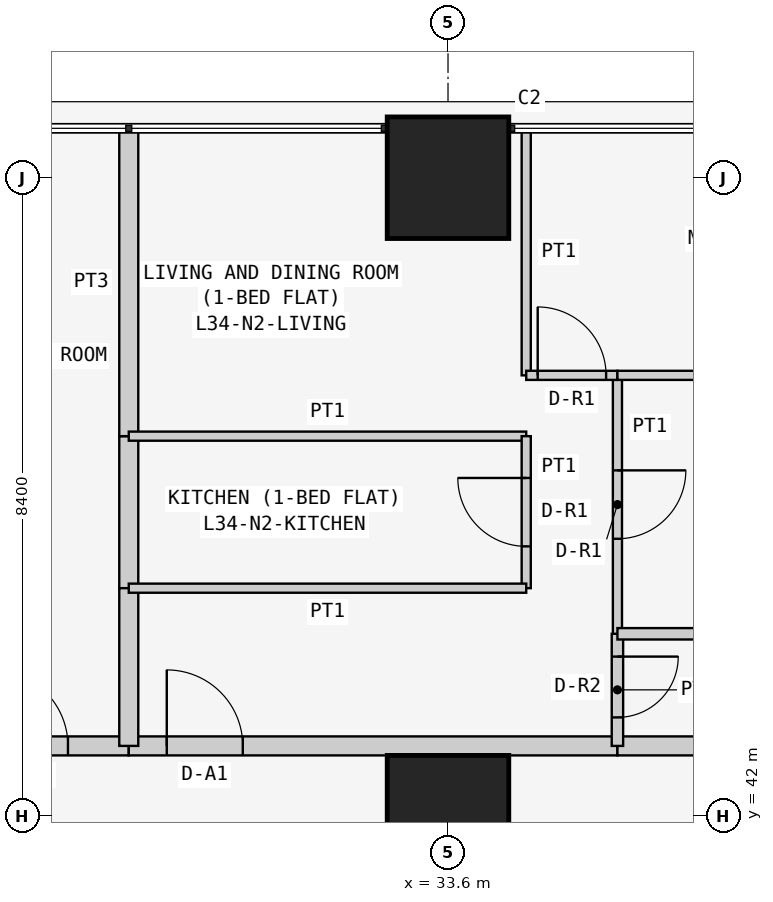
"""IFC4 building model, lengths in metres.
Left out: names, types, materials, properties, quantities, classifications, styles, units other than length and angle.
Written with IfcOpenShell. Run it as: python <this file> out.ifc"""

import sys

from ifc_helpers import new_model, si_unit, direction, frame, frame_2d, origin, origin_2d, place, context, subcontext, project, spatial, rectangle, extrude, element, fill, save


model = new_model("IFC4")
c1 = context("Model", 3, precision=1e-05, world=origin(), true_north=direction((0.0, 1.0)))
c2 = subcontext(c1, "Body", "Model", "MODEL_VIEW")
j1 = project(units=[si_unit("LENGTHUNIT", "METRE"), si_unit("PLANEANGLEUNIT", "RADIAN")], contexts=[c1])
p1 = place(None, origin())
s1 = spatial("IfcSite", under=j1, at=p1, CompositionType="ELEMENT")
p2 = place(p1, origin())
s2 = spatial("IfcBuilding", under=s1, at=p2, CompositionType="ELEMENT")
p3 = place(p2, frame((0.0, 0.0, 134.1)))
s3 = spatial("IfcBuildingStorey", under=s2, at=p3, CompositionType="ELEMENT", Elevation=134.1)
for number, where, z_axis, x_axis in (
    (1, (33.6, 42.0, 0.0), (0.0, 0.0, 1.0), (1.0, 0.0, 0.0)),
    (2, (33.6, 50.4, 0.0), (0.0, 0.0, 1.0), (1.0, 0.0, 0.0)),
):
    element("IfcColumn", number, at=place(p3, frame(where, z_axis=z_axis, x_axis=x_axis)), inside=s3, PredefinedType="COLUMN", context=c2, shape_type="SweptSolid", body=[
        extrude(rectangle(XDim=1.6, YDim=1.6, at=origin_2d()), origin(), (0.0, 0.0, 1.0), 3.6),
    ])
p4 = place(p3, frame((26.8, 42.925, 0.0), z_axis=(0.0, 0.0, 1.0), x_axis=(1.0, 0.0, 0.0)))
e3 = element("IfcWall", 3, at=p4, inside=s3, PredefinedType="PARTITIONING", context=c2, shape_type="SweptSolid", body=[
    extrude(rectangle(XDim=2.6, YDim=0.25, at=frame_2d((1.3, 0.0))), origin(), (0.0, 0.0, 1.0), 3.45),
])
p5 = place(p4, frame((0.8, 0.0, 0.0)))
e4 = element("IfcOpeningElement", 4, at=p5, cuts=e3, PredefinedType="OPENING", context=c2, shape_type="SweptSolid", body=[
    extrude(rectangle(XDim=1.0, YDim=2.1, at=frame_2d((0.5, 1.05))), frame((0.0, 0.135, 0.0), z_axis=(0.0, -1.0, 0.0), x_axis=(1.0, 0.0, 0.0)), (0.0, 0.0, 1.0), 0.27),
])
p6 = place(p3, frame((29.4, 42.925, 0.0), z_axis=(0.0, 0.0, 1.0), x_axis=(1.0, 0.0, 0.0)))
e5 = element("IfcWall", 5, at=p6, inside=s3, PredefinedType="PARTITIONING", context=c2, shape_type="SweptSolid", body=[
    extrude(rectangle(XDim=6.429, YDim=0.25, at=frame_2d((3.215, 0.0))), origin(), (0.0, 0.0, 1.0), 3.45),
])
p7 = place(p6, frame((0.5, 0.0, 0.0)))
e6 = element("IfcOpeningElement", 6, at=p7, cuts=e5, PredefinedType="OPENING", context=c2, shape_type="SweptSolid", body=[
    extrude(rectangle(XDim=1.0, YDim=2.1, at=frame_2d((0.5, 1.05))), frame((0.0, 0.135, 0.0), z_axis=(0.0, -1.0, 0.0), x_axis=(1.0, 0.0, 0.0)), (0.0, 0.0, 1.0), 0.27),
])
p8 = place(p3, frame((35.829, 42.925, 0.0), z_axis=(0.0, 0.0, 1.0), x_axis=(1.0, 0.0, 0.0)))
e7 = element("IfcWall", 7, at=p8, inside=s3, PredefinedType="PARTITIONING", context=c2, shape_type="SweptSolid", body=[
    extrude(rectangle(XDim=6.871, YDim=0.25, at=frame_2d((3.436, 0.0))), origin(), (0.0, 0.0, 1.0), 3.45),
])
p9 = place(p3, frame((29.4, 47.0, 0.0), z_axis=(0.0, 0.0, 1.0), x_axis=(0.0, -1.0, 0.0)))
e8 = element("IfcWall", 8, at=p9, inside=s3, PredefinedType="PARTITIONING", context=c2, shape_type="SweptSolid", body=[
    extrude(rectangle(XDim=2.0, YDim=0.25, at=frame_2d((1.0, 0.0))), origin(), (0.0, 0.0, 1.0), 2.848),
])
p10 = place(p3, frame((29.4, 45.0, 0.0), z_axis=(0.0, 0.0, 1.0), x_axis=(0.0, -1.0, 0.0)))
e9 = element("IfcWall", 9, at=p10, inside=s3, PredefinedType="PARTITIONING", context=c2, shape_type="SweptSolid", body=[
    extrude(rectangle(XDim=2.075, YDim=0.25, at=frame_2d((1.038, 0.0))), origin(), (0.0, 0.0, 1.0), 2.848),
])
p11 = place(p3, frame((29.4, 51.05, 0.0), z_axis=(0.0, 0.0, 1.0), x_axis=(0.0, -1.0, 0.0)))
e10 = element("IfcWall", 10, at=p11, inside=s3, PredefinedType="PARTITIONING", context=c2, shape_type="SweptSolid", body=[
    extrude(rectangle(XDim=4.05, YDim=0.25, at=frame_2d((2.025, 0.0))), origin(), (0.0, 0.0, 1.0), 2.848),
])
p12 = place(p3, frame((29.4, 47.0, 0.0), z_axis=(0.0, 0.0, 1.0), x_axis=(1.0, 0.0, 0.0)))
e11 = element("IfcWall", 11, at=p12, inside=s3, PredefinedType="PARTITIONING", context=c2, shape_type="SweptSolid", body=[
    extrude(rectangle(XDim=5.229, YDim=0.12, at=frame_2d((2.615, 0.0))), origin(), (0.0, 0.0, 1.0), 3.45),
])
p13 = place(p3, frame((34.629, 47.0, 0.0), z_axis=(0.0, 0.0, 1.0), x_axis=(0.0, -1.0, 0.0)))
e12 = element("IfcWall", 12, at=p13, inside=s3, PredefinedType="PARTITIONING", context=c2, shape_type="SweptSolid", body=[
    extrude(rectangle(XDim=2.0, YDim=0.12, at=frame_2d((1.0, 0.0))), origin(), (0.0, 0.0, 1.0), 3.45),
])
p14 = place(p13, frame((0.55, 0.0, 0.0)))
e13 = element("IfcOpeningElement", 13, at=p14, cuts=e12, PredefinedType="OPENING", context=c2, shape_type="SweptSolid", body=[
    extrude(rectangle(XDim=0.9, YDim=2.1, at=frame_2d((0.45, 1.05))), frame((0.0, 0.07, 0.0), z_axis=(0.0, -1.0, 0.0), x_axis=(1.0, 0.0, 0.0)), (0.0, 0.0, 1.0), 0.14),
])
p15 = place(p3, frame((34.629, 45.0, 0.0), z_axis=(0.0, 0.0, 1.0), x_axis=(-1.0, 0.0, 0.0)))
e14 = element("IfcWall", 14, at=p15, inside=s3, PredefinedType="PARTITIONING", context=c2, shape_type="SweptSolid", body=[
    extrude(rectangle(XDim=5.229, YDim=0.12, at=frame_2d((2.615, 0.0))), origin(), (0.0, 0.0, 1.0), 3.45),
])
p16 = place(p3, frame((35.829, 44.4, 0.0), z_axis=(0.0, 0.0, 1.0), x_axis=(0.0, -1.0, 0.0)))
e15 = element("IfcWall", 15, at=p16, inside=s3, PredefinedType="PARTITIONING", context=c2, shape_type="SweptSolid", body=[
    extrude(rectangle(XDim=1.475, YDim=0.15, at=frame_2d((0.737, 0.0))), origin(), (0.0, 0.0, 1.0), 3.45),
])
p17 = place(p16, frame((0.3, 0.0, 0.0)))
e16 = element("IfcOpeningElement", 16, at=p17, cuts=e15, PredefinedType="OPENING", context=c2, shape_type="SweptSolid", body=[
    extrude(rectangle(XDim=0.8, YDim=2.1, at=frame_2d((0.4, 1.05))), frame((0.0, 0.085, 0.0), z_axis=(0.0, -1.0, 0.0), x_axis=(1.0, 0.0, 0.0)), (0.0, 0.0, 1.0), 0.17),
])
p18 = place(p3, frame((35.829, 47.8, 0.0), z_axis=(0.0, 0.0, 1.0), x_axis=(0.0, -1.0, 0.0)))
e17 = element("IfcWall", 17, at=p18, inside=s3, PredefinedType="PARTITIONING", context=c2, shape_type="SweptSolid", body=[
    extrude(rectangle(XDim=3.4, YDim=0.12, at=frame_2d((1.7, 0.0))), origin(), (0.0, 0.0, 1.0), 3.45),
])
p19 = place(p18, frame((1.25, 0.0, 0.0)))
e18 = element("IfcOpeningElement", 18, at=p19, cuts=e17, PredefinedType="OPENING", context=c2, shape_type="SweptSolid", body=[
    extrude(rectangle(XDim=0.9, YDim=2.1, at=frame_2d((0.45, 1.05))), frame((0.0, 0.07, 0.0), z_axis=(0.0, -1.0, 0.0), x_axis=(1.0, 0.0, 0.0)), (0.0, 0.0, 1.0), 0.14),
])
p20 = place(p3, frame((34.629, 51.05, 0.0), z_axis=(0.0, 0.0, 1.0), x_axis=(0.0, -1.0, 0.0)))
e19 = element("IfcWall", 19, at=p20, inside=s3, PredefinedType="PARTITIONING", context=c2, shape_type="SweptSolid", body=[
    extrude(rectangle(XDim=3.25, YDim=0.12, at=frame_2d((1.625, 0.0))), origin(), (0.0, 0.0, 1.0), 3.45),
])
p21 = place(p3, frame((34.629, 47.8, 0.0), z_axis=(0.0, 0.0, 1.0), x_axis=(1.0, 0.0, 0.0)))
e20 = element("IfcWall", 20, at=p21, inside=s3, PredefinedType="PARTITIONING", context=c2, shape_type="SweptSolid", body=[
    extrude(rectangle(XDim=1.2, YDim=0.12, at=frame_2d((0.6, 0.0))), origin(), (0.0, 0.0, 1.0), 3.45),
])
p22 = place(p21, frame((0.151, 0.0, 0.0)))
e21 = element("IfcOpeningElement", 21, at=p22, cuts=e20, PredefinedType="OPENING", context=c2, shape_type="SweptSolid", body=[
    extrude(rectangle(XDim=0.9, YDim=2.1, at=frame_2d((0.45, 1.05))), frame((0.0, 0.07, 0.0), z_axis=(0.0, -1.0, 0.0), x_axis=(1.0, 0.0, 0.0)), (0.0, 0.0, 1.0), 0.14),
])
p23 = place(p3, frame((35.829, 44.4, 0.0), z_axis=(0.0, 0.0, 1.0), x_axis=(1.0, 0.0, 0.0)))
e22 = element("IfcWall", 22, at=p23, inside=s3, PredefinedType="PARTITIONING", context=c2, shape_type="SweptSolid", body=[
    extrude(rectangle(XDim=6.871, YDim=0.15, at=frame_2d((3.436, 0.0))), origin(), (0.0, 0.0, 1.0), 3.45),
])
p24 = place(p3, frame((35.829, 47.8, 0.0), z_axis=(0.0, 0.0, 1.0), x_axis=(1.0, 0.0, 0.0)))
e23 = element("IfcWall", 23, at=p24, inside=s3, PredefinedType="PARTITIONING", context=c2, shape_type="SweptSolid", body=[
    extrude(rectangle(XDim=6.871, YDim=0.12, at=frame_2d((3.436, 0.0))), origin(), (0.0, 0.0, 1.0), 3.45),
])
p25 = place(p5, origin())
e24 = element("IfcDoor", 24, at=p25, inside=s3, OperationType="SINGLE_SWING_LEFT", PredefinedType="DOOR", context=c2, shape_type="SweptSolid", body=[
    extrude(rectangle(XDim=1.0, YDim=2.1, at=frame_2d((0.5, 1.05))), frame((0.0, 0.025, 0.0), z_axis=(0.0, -1.0, 0.0), x_axis=(1.0, 0.0, 0.0)), (0.0, 0.0, 1.0), 0.05),
])
fill(e4, e24)
p26 = place(p7, origin())
e25 = element("IfcDoor", 25, at=p26, inside=s3, OperationType="SINGLE_SWING_LEFT", PredefinedType="DOOR", context=c2, shape_type="SweptSolid", body=[
    extrude(rectangle(XDim=1.0, YDim=2.1, at=frame_2d((0.5, 1.05))), frame((0.0, 0.025, 0.0), z_axis=(0.0, -1.0, 0.0), x_axis=(1.0, 0.0, 0.0)), (0.0, 0.0, 1.0), 0.05),
])
fill(e6, e25)
p27 = place(p14, frame((0.9, 0.0, 0.0), z_axis=(0.0, 0.0, 1.0), x_axis=(-1.0, 0.0, 0.0)))
e26 = element("IfcDoor", 26, at=p27, inside=s3, OperationType="SINGLE_SWING_RIGHT", PredefinedType="DOOR", context=c2, shape_type="SweptSolid", body=[
    extrude(rectangle(XDim=0.9, YDim=2.1, at=frame_2d((0.45, 1.05))), frame((0.0, 0.025, 0.0), z_axis=(0.0, -1.0, 0.0), x_axis=(1.0, 0.0, 0.0)), (0.0, 0.0, 1.0), 0.05),
])
fill(e13, e26)
p28 = place(p17, origin())
e27 = element("IfcDoor", 27, at=p28, inside=s3, OperationType="SINGLE_SWING_LEFT", PredefinedType="DOOR", context=c2, shape_type="SweptSolid", body=[
    extrude(rectangle(XDim=0.8, YDim=2.1, at=frame_2d((0.4, 1.05))), frame((0.0, 0.025, 0.0), z_axis=(0.0, -1.0, 0.0), x_axis=(1.0, 0.0, 0.0)), (0.0, 0.0, 1.0), 0.05),
])
fill(e16, e27)
p29 = place(p19, origin())
e28 = element("IfcDoor", 28, at=p29, inside=s3, OperationType="SINGLE_SWING_LEFT", PredefinedType="DOOR", context=c2, shape_type="SweptSolid", body=[
    extrude(rectangle(XDim=0.9, YDim=2.1, at=frame_2d((0.45, 1.05))), frame((0.0, 0.025, 0.0), z_axis=(0.0, -1.0, 0.0), x_axis=(1.0, 0.0, 0.0)), (0.0, 0.0, 1.0), 0.05),
])
fill(e18, e28)
p30 = place(p22, origin())
e29 = element("IfcDoor", 29, at=p30, inside=s3, OperationType="SINGLE_SWING_LEFT", PredefinedType="DOOR", context=c2, shape_type="SweptSolid", body=[
    extrude(rectangle(XDim=0.9, YDim=2.1, at=frame_2d((0.45, 1.05))), frame((0.0, 0.025, 0.0), z_axis=(0.0, -1.0, 0.0), x_axis=(1.0, 0.0, 0.0)), (0.0, 0.0, 1.0), 0.05),
])
fill(e21, e29)
save(model, sys.argv[1])
